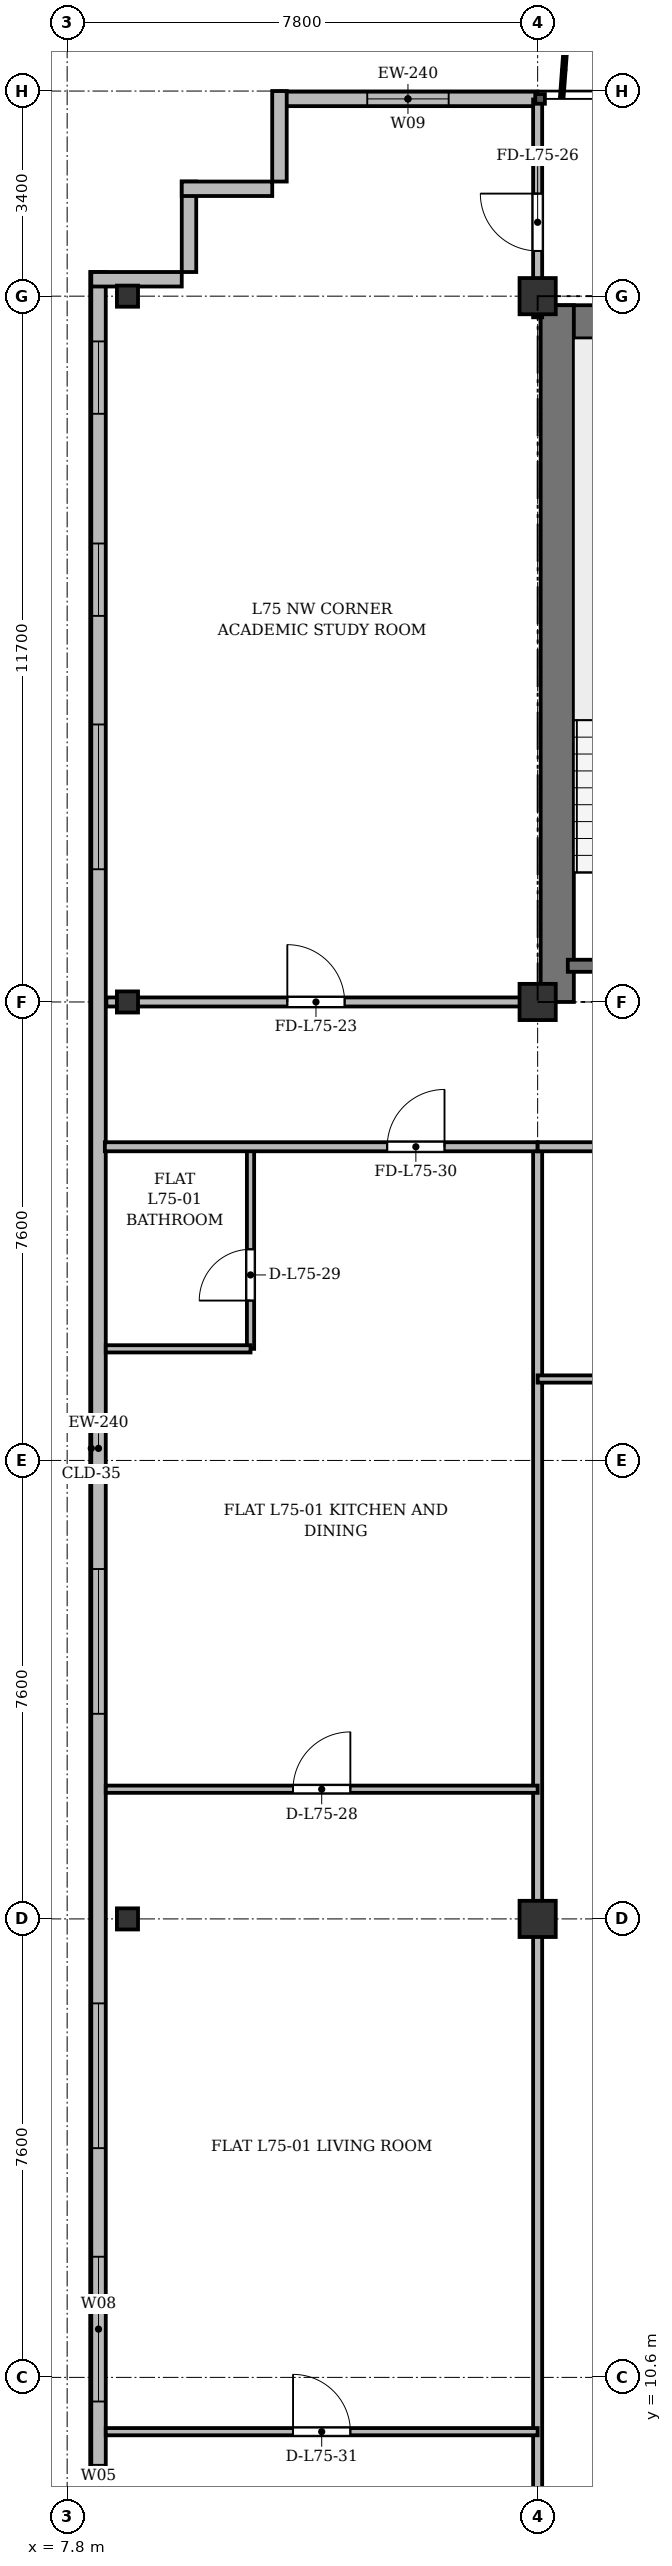
"""IFC4 building model, lengths in metres.
Left out: names, types, materials, properties, quantities, classifications, styles, units other than length and angle.
Written with IfcOpenShell. Run it as: python <this file> out.ifc"""

import sys

from ifc_helpers import new_model, si_unit, direction, frame, frame_2d, origin, origin_2d, place, context, subcontext, project, spatial, rectangle, i_section, extrude, source, transform, mapped, element, fill, save


model = new_model("IFC4")
c1 = context("Model", 3, precision=1e-05, world=origin(), true_north=direction((0.0, 1.0)))
c2 = subcontext(c1, "Body", "Model", "MODEL_VIEW")
j1 = project(units=[si_unit("LENGTHUNIT", "METRE"), si_unit("PLANEANGLEUNIT", "RADIAN")], contexts=[c1])
p1 = place(None, origin())
s1 = spatial("IfcSite", under=j1, at=p1, CompositionType="ELEMENT")
p2 = place(p1, origin())
s2 = spatial("IfcBuilding", under=s1, at=p2, CompositionType="ELEMENT")
p3 = place(p2, frame((0.0, 0.0, 288.3)))
s3 = spatial("IfcBuildingStorey", under=s2, at=p3, CompositionType="ELEMENT", Elevation=288.3)
m1 = source(origin(), c2, "Body", "SweptSolid", [
    extrude(i_section(OverallWidth=0.35, OverallDepth=0.35, WebThickness=0.018, FlangeThickness=0.028, at=origin_2d()), origin(), (0.0, 0.0, 1.0), 3.6),
])
for number, where, z_axis, x_axis in (
    (1, (8.8, 18.2, 0.0), (0.0, 0.0, 1.0), (1.0, 0.0, 0.0)),
    (2, (8.8, 33.4, 0.0), (0.0, 0.0, 1.0), (1.0, 0.0, 0.0)),
    (3, (8.8, 45.1, 0.0), (0.0, 0.0, 1.0), (1.0, 0.0, 0.0)),
):
    element("IfcColumn", number, at=place(p3, frame(where, z_axis=z_axis, x_axis=x_axis)), inside=s3, PredefinedType="COLUMN", context=c2, shape_type="MappedRepresentation", body=[
        mapped(m1, transform((0.0, 0.0, 0.0), x_axis=(1.0, 0.0, 0.0), y_axis=(0.0, 1.0, 0.0), z_axis=(0.0, 0.0, 1.0), scale=1.0)),
    ])
m2 = source(origin(), c2, "Body", "SweptSolid", [
    extrude(rectangle(XDim=0.6, YDim=0.6, at=origin_2d()), origin(), (0.0, 0.0, 1.0), 3.6),
])
for number, where, z_axis, x_axis in (
    (4, (15.6, 18.2, 0.0), (0.0, 0.0, 1.0), (1.0, 0.0, 0.0)),
    (5, (15.6, 33.4, 0.0), (0.0, 0.0, 1.0), (1.0, 0.0, 0.0)),
    (6, (15.6, 45.1, 0.0), (0.0, 0.0, 1.0), (1.0, 0.0, 0.0)),
):
    element("IfcColumn", number, at=place(p3, frame(where, z_axis=z_axis, x_axis=x_axis)), inside=s3, PredefinedType="COLUMN", context=c2, shape_type="MappedRepresentation", body=[
        mapped(m2, transform((0.0, 0.0, 0.0), x_axis=(1.0, 0.0, 0.0), y_axis=(0.0, 1.0, 0.0), z_axis=(0.0, 0.0, 1.0), scale=1.0)),
    ])
p4 = place(p3, frame((11.3, 48.37, 0.0), z_axis=(0.0, 0.0, 1.0), x_axis=(1.0, 0.0, 0.0)))
e7 = element("IfcWall", 7, at=p4, inside=s3, PredefinedType="SOLIDWALL", context=c2, shape_type="SweptSolid", body=[
    extrude(rectangle(XDim=4.3, YDim=0.24, at=frame_2d((2.15, 0.0))), origin(), (0.0, 0.0, 1.0), 3.37),
])
p5 = place(p4, frame((1.475, 0.0, 0.9)))
e8 = element("IfcOpeningElement", 8, at=p5, cuts=e7, PredefinedType="OPENING", context=c2, shape_type="SweptSolid", body=[
    extrude(rectangle(XDim=1.35, YDim=1.5, at=frame_2d((0.675, 0.75))), frame((0.0, 0.13, 0.0), z_axis=(0.0, -1.0, 0.0), x_axis=(1.0, 0.0, 0.0)), (0.0, 0.0, 1.0), 0.26),
])
p6 = place(p3, frame((8.32, 6.5, 0.0), z_axis=(0.0, 0.0, 1.0), x_axis=(0.0, 1.0, 0.0)))
e9 = element("IfcWall", 9, at=p6, inside=s3, PredefinedType="SOLIDWALL", context=c2, shape_type="SweptSolid", body=[
    extrude(rectangle(XDim=39.0, YDim=0.24, at=frame_2d((19.5, 0.0))), origin(), (0.0, 0.0, 1.0), 3.37),
])
p7 = place(p6, frame((1.45, 0.0, 0.92)))
e10 = element("IfcOpeningElement", 10, at=p7, cuts=e9, PredefinedType="OPENING", context=c2, shape_type="SweptSolid", body=[
    extrude(rectangle(XDim=1.2, YDim=1.65, at=frame_2d((0.6, 0.825))), frame((0.0, 0.13, 0.0), z_axis=(0.0, -1.0, 0.0), x_axis=(1.0, 0.0, 0.0)), (0.0, 0.0, 1.0), 0.26),
])
p8 = place(p6, frame((3.7, 0.0, 0.92)))
e11 = element("IfcOpeningElement", 11, at=p8, cuts=e9, PredefinedType="OPENING", context=c2, shape_type="SweptSolid", body=[
    extrude(rectangle(XDim=2.4, YDim=2.1, at=frame_2d((1.2, 1.05))), frame((0.0, 0.13, 0.0), z_axis=(0.0, -1.0, 0.0), x_axis=(1.0, 0.0, 0.0)), (0.0, 0.0, 1.0), 0.26),
])
p9 = place(p6, frame((7.9, 0.0, 0.92)))
e12 = element("IfcOpeningElement", 12, at=p9, cuts=e9, PredefinedType="OPENING", context=c2, shape_type="SweptSolid", body=[
    extrude(rectangle(XDim=2.4, YDim=2.1, at=frame_2d((1.2, 1.05))), frame((0.0, 0.13, 0.0), z_axis=(0.0, -1.0, 0.0), x_axis=(1.0, 0.0, 0.0)), (0.0, 0.0, 1.0), 0.26),
])
p10 = place(p6, frame((15.1, 0.0, 0.92)))
e13 = element("IfcOpeningElement", 13, at=p10, cuts=e9, PredefinedType="OPENING", context=c2, shape_type="SweptSolid", body=[
    extrude(rectangle(XDim=2.4, YDim=2.1, at=frame_2d((1.2, 1.05))), frame((0.0, 0.13, 0.0), z_axis=(0.0, -1.0, 0.0), x_axis=(1.0, 0.0, 0.0)), (0.0, 0.0, 1.0), 0.26),
])
p11 = place(p6, frame((29.1, 0.0, 0.92)))
e14 = element("IfcOpeningElement", 14, at=p11, cuts=e9, PredefinedType="OPENING", context=c2, shape_type="SweptSolid", body=[
    extrude(rectangle(XDim=2.4, YDim=2.1, at=frame_2d((1.2, 1.05))), frame((0.0, 0.13, 0.0), z_axis=(0.0, -1.0, 0.0), x_axis=(1.0, 0.0, 0.0)), (0.0, 0.0, 1.0), 0.26),
])
p12 = place(p6, frame((33.3, 0.0, 0.92)))
e15 = element("IfcOpeningElement", 15, at=p12, cuts=e9, PredefinedType="OPENING", context=c2, shape_type="SweptSolid", body=[
    extrude(rectangle(XDim=1.2, YDim=1.65, at=frame_2d((0.6, 0.825))), frame((0.0, 0.13, 0.0), z_axis=(0.0, -1.0, 0.0), x_axis=(1.0, 0.0, 0.0)), (0.0, 0.0, 1.0), 0.26),
])
p13 = place(p6, frame((36.65, 0.0, 0.92)))
e16 = element("IfcOpeningElement", 16, at=p13, cuts=e9, PredefinedType="OPENING", context=c2, shape_type="SweptSolid", body=[
    extrude(rectangle(XDim=1.2, YDim=1.65, at=frame_2d((0.6, 0.825))), frame((0.0, 0.13, 0.0), z_axis=(0.0, -1.0, 0.0), x_axis=(1.0, 0.0, 0.0)), (0.0, 0.0, 1.0), 0.26),
])
for number, where, z_axis, x_axis in (
    (17, (8.2, 45.38, 0.0), (0.0, 0.0, 1.0), (1.0, 0.0, 0.0)),
    (18, (9.82, 45.5, 0.0), (0.0, 0.0, 1.0), (0.0, 1.0, 0.0)),
    (19, (9.7, 46.88, 0.0), (0.0, 0.0, 1.0), (1.0, 0.0, 0.0)),
    (20, (11.32, 47.0, 0.0), (0.0, 0.0, 1.0), (0.0, 1.0, 0.0)),
):
    element("IfcWall", number, at=place(p3, frame(where, z_axis=z_axis, x_axis=x_axis)), inside=s3, PredefinedType="SOLIDWALL", context=c2, shape_type="SweptSolid", body=[
        extrude(rectangle(XDim=1.5, YDim=0.24, at=frame_2d((0.75, 0.0))), origin(), (0.0, 0.0, 1.0), 3.37),
    ])
p14 = place(p3, frame((15.65, 44.675, 0.0), z_axis=(0.0, 0.0, 1.0), x_axis=(1.0, 0.0, 0.0)))
e21 = element("IfcWall", 21, at=p14, inside=s3, PredefinedType="SHEAR", context=c2, shape_type="SweptSolid", body=[
    extrude(rectangle(XDim=43.1, YDim=0.55, at=frame_2d((21.55, 0.0))), origin(), (0.0, 0.0, 1.0), 3.37),
])
p15 = place(p3, frame((15.925, 33.4, 0.0), z_axis=(0.0, 0.0, 1.0), x_axis=(0.0, 1.0, 0.0)))
e22 = element("IfcWall", 22, at=p15, inside=s3, PredefinedType="SHEAR", context=c2, shape_type="SweptSolid", body=[
    extrude(rectangle(XDim=11.55, YDim=0.55, at=frame_2d((5.775, 0.0))), origin(), (0.0, 0.0, 1.0), 3.37),
])
p16 = place(p3, frame((16.1, 34.0, 0.0), z_axis=(0.0, 0.0, 1.0), x_axis=(1.0, 0.0, 0.0)))
e23 = element("IfcWall", 23, at=p16, inside=s3, PredefinedType="SHEAR", context=c2, shape_type="SweptSolid", body=[
    extrude(rectangle(XDim=3.4, YDim=0.2, at=frame_2d((1.7, 0.0))), origin(), (0.0, 0.0, 1.0), 3.37),
])
p17 = place(p3, frame((8.45, 33.4, 0.0), z_axis=(0.0, 0.0, 1.0), x_axis=(1.0, 0.0, 0.0)))
e24 = element("IfcWall", 24, at=p17, inside=s3, PredefinedType="PARTITIONING", context=c2, shape_type="SweptSolid", body=[
    extrude(rectangle(XDim=7.15, YDim=0.15, at=frame_2d((3.575, 0.0))), origin(), (0.0, 0.0, 1.0), 2.92),
])
p18 = place(p17, frame((3.0, 0.0, 0.0)))
e25 = element("IfcOpeningElement", 25, at=p18, cuts=e24, PredefinedType="OPENING", context=c2, shape_type="SweptSolid", body=[
    extrude(rectangle(XDim=0.95, YDim=2.15, at=frame_2d((0.475, 1.075))), frame((0.0, 0.085, 0.0), z_axis=(0.0, -1.0, 0.0), x_axis=(1.0, 0.0, 0.0)), (0.0, 0.0, 1.0), 0.17),
])
p19 = place(p3, frame((15.6, 44.75, 0.0), z_axis=(0.0, 0.0, 1.0), x_axis=(0.0, 1.0, 0.0)))
e26 = element("IfcWall", 26, at=p19, inside=s3, PredefinedType="PARTITIONING", context=c2, shape_type="SweptSolid", body=[
    extrude(rectangle(XDim=3.61, YDim=0.15, at=frame_2d((1.805, 0.0))), origin(), (0.0, 0.0, 1.0), 2.87),
])
p20 = place(p19, frame((1.1, 0.0, 0.0)))
e27 = element("IfcOpeningElement", 27, at=p20, cuts=e26, PredefinedType="OPENING", context=c2, shape_type="SweptSolid", body=[
    extrude(rectangle(XDim=0.95, YDim=2.15, at=frame_2d((0.475, 1.075))), frame((0.0, 0.085, 0.0), z_axis=(0.0, -1.0, 0.0), x_axis=(1.0, 0.0, 0.0)), (0.0, 0.0, 1.0), 0.17),
])
p21 = place(p3, frame((15.6, 3.725, 0.0), z_axis=(0.0, 0.0, 1.0), x_axis=(0.0, 1.0, 0.0)))
e28 = element("IfcWall", 28, at=p21, inside=s3, PredefinedType="PARTITIONING", context=c2, shape_type="SweptSolid", body=[
    extrude(rectangle(XDim=27.275, YDim=0.15, at=frame_2d((13.637, 0.0))), origin(), (0.0, 0.0, 1.0), 2.87),
])
p22 = place(p3, frame((8.44, 20.35, 0.0), z_axis=(0.0, 0.0, 1.0), x_axis=(1.0, 0.0, 0.0)))
e29 = element("IfcWall", 29, at=p22, inside=s3, PredefinedType="PARTITIONING", context=c2, shape_type="SweptSolid", body=[
    extrude(rectangle(XDim=7.16, YDim=0.12, at=frame_2d((3.58, 0.0))), origin(), (0.0, 0.0, 1.0), 2.87),
])
p23 = place(p22, frame((3.105, 0.0, 0.0)))
e30 = element("IfcOpeningElement", 30, at=p23, cuts=e29, PredefinedType="OPENING", context=c2, shape_type="SweptSolid", body=[
    extrude(rectangle(XDim=0.95, YDim=2.15, at=frame_2d((0.475, 1.075))), frame((0.0, 0.07, 0.0), z_axis=(0.0, -1.0, 0.0), x_axis=(1.0, 0.0, 0.0)), (0.0, 0.0, 1.0), 0.14),
])
p24 = place(p3, frame((10.84, 27.65, 0.0), z_axis=(0.0, 0.0, 1.0), x_axis=(0.0, 1.0, 0.0)))
e31 = element("IfcWall", 31, at=p24, inside=s3, PredefinedType="PARTITIONING", context=c2, shape_type="SweptSolid", body=[
    extrude(rectangle(XDim=3.35, YDim=0.12, at=frame_2d((1.675, 0.0))), origin(), (0.0, 0.0, 1.0), 3.37),
])
p25 = place(p24, frame((0.8, 0.0, 0.0)))
e32 = element("IfcOpeningElement", 32, at=p25, cuts=e31, PredefinedType="OPENING", context=c2, shape_type="SweptSolid", body=[
    extrude(rectangle(XDim=0.85, YDim=2.1, at=frame_2d((0.425, 1.05))), frame((0.0, 0.07, 0.0), z_axis=(0.0, -1.0, 0.0), x_axis=(1.0, 0.0, 0.0)), (0.0, 0.0, 1.0), 0.14),
])
p26 = place(p3, frame((8.44, 27.65, 0.0), z_axis=(0.0, 0.0, 1.0), x_axis=(1.0, 0.0, 0.0)))
e33 = element("IfcWall", 33, at=p26, inside=s3, PredefinedType="PARTITIONING", context=c2, shape_type="SweptSolid", body=[
    extrude(rectangle(XDim=2.4, YDim=0.12, at=frame_2d((1.2, 0.0))), origin(), (0.0, 0.0, 1.0), 2.87),
])
p27 = place(p3, frame((8.425, 31.0, 0.0), z_axis=(0.0, 0.0, 1.0), x_axis=(1.0, 0.0, 0.0)))
e34 = element("IfcWall", 34, at=p27, inside=s3, PredefinedType="PARTITIONING", context=c2, shape_type="SweptSolid", body=[
    extrude(rectangle(XDim=7.175, YDim=0.15, at=frame_2d((3.587, 0.0))), origin(), (0.0, 0.0, 1.0), 2.87),
])
p28 = place(p27, frame((4.681, 0.0, 0.0)))
e35 = element("IfcOpeningElement", 35, at=p28, cuts=e34, PredefinedType="OPENING", context=c2, shape_type="SweptSolid", body=[
    extrude(rectangle(XDim=0.95, YDim=2.15, at=frame_2d((0.475, 1.075))), frame((0.0, 0.085, 0.0), z_axis=(0.0, -1.0, 0.0), x_axis=(1.0, 0.0, 0.0)), (0.0, 0.0, 1.0), 0.17),
])
p29 = place(p3, frame((8.44, 9.7, 0.0), z_axis=(0.0, 0.0, 1.0), x_axis=(1.0, 0.0, 0.0)))
e36 = element("IfcWall", 36, at=p29, inside=s3, PredefinedType="PARTITIONING", context=c2, shape_type="SweptSolid", body=[
    extrude(rectangle(XDim=7.16, YDim=0.12, at=frame_2d((3.58, 0.0))), origin(), (0.0, 0.0, 1.0), 2.87),
])
p30 = place(p29, frame((3.105, 0.0, 0.0)))
e37 = element("IfcOpeningElement", 37, at=p30, cuts=e36, PredefinedType="OPENING", context=c2, shape_type="SweptSolid", body=[
    extrude(rectangle(XDim=0.95, YDim=2.15, at=frame_2d((0.475, 1.075))), frame((0.0, 0.07, 0.0), z_axis=(0.0, -1.0, 0.0), x_axis=(1.0, 0.0, 0.0)), (0.0, 0.0, 1.0), 0.14),
])
p31 = place(p3, frame((15.6, 31.0, 0.0), z_axis=(0.0, 0.0, 1.0), x_axis=(1.0, 0.0, 0.0)))
e38 = element("IfcWall", 38, at=p31, inside=s3, PredefinedType="PARTITIONING", context=c2, shape_type="SweptSolid", body=[
    extrude(rectangle(XDim=7.8, YDim=0.15, at=frame_2d((3.9, 0.0))), origin(), (0.0, 0.0, 1.0), 2.87),
])
p32 = place(p31, frame((3.333, 0.0, 0.0)))
e39 = element("IfcOpeningElement", 39, at=p32, cuts=e38, PredefinedType="OPENING", context=c2, shape_type="SweptSolid", body=[
    extrude(rectangle(XDim=0.95, YDim=2.15, at=frame_2d((0.475, 1.075))), frame((0.0, 0.085, 0.0), z_axis=(0.0, -1.0, 0.0), x_axis=(1.0, 0.0, 0.0)), (0.0, 0.0, 1.0), 0.17),
])
p33 = place(p3, frame((15.6, 27.15, 0.0), z_axis=(0.0, 0.0, 1.0), x_axis=(1.0, 0.0, 0.0)))
e40 = element("IfcWall", 40, at=p33, inside=s3, PredefinedType="PARTITIONING", context=c2, shape_type="SweptSolid", body=[
    extrude(rectangle(XDim=7.8, YDim=0.12, at=frame_2d((3.9, 0.0))), origin(), (0.0, 0.0, 1.0), 2.87),
])
p34 = place(p33, frame((3.333, 0.0, 0.0)))
e41 = element("IfcOpeningElement", 41, at=p34, cuts=e40, PredefinedType="OPENING", context=c2, shape_type="SweptSolid", body=[
    extrude(rectangle(XDim=0.95, YDim=2.15, at=frame_2d((0.475, 1.075))), frame((0.0, 0.07, 0.0), z_axis=(0.0, -1.0, 0.0), x_axis=(1.0, 0.0, 0.0)), (0.0, 0.0, 1.0), 0.14),
])
m3 = source(origin(), c2, "Body", "SweptSolid", [
    extrude(rectangle(XDim=1.35, YDim=1.5, at=frame_2d((0.675, 0.75))), frame((0.0, 0.03, 0.0), z_axis=(0.0, -1.0, 0.0), x_axis=(1.0, 0.0, 0.0)), (0.0, 0.0, 1.0), 0.06),
])
p35 = place(p5, origin())
e42 = element("IfcWindow", 42, at=p35, inside=s3, PartitioningType="SINGLE_PANEL", PredefinedType="WINDOW", context=c2, shape_type="MappedRepresentation", body=[
    mapped(m3, transform((0.0, 0.0, 0.0), x_axis=(1.0, 0.0, 0.0), y_axis=(0.0, 1.0, 0.0), z_axis=(0.0, 0.0, 1.0), scale=1.0)),
])
fill(e8, e42)
m4 = source(origin(), c2, "Body", "SweptSolid", [
    extrude(rectangle(XDim=1.2, YDim=1.65, at=frame_2d((0.6, 0.825))), frame((0.0, 0.03, 0.0), z_axis=(0.0, -1.0, 0.0), x_axis=(1.0, 0.0, 0.0)), (0.0, 0.0, 1.0), 0.06),
])
p36 = place(p7, origin())
e43 = element("IfcWindow", 43, at=p36, inside=s3, PartitioningType="SINGLE_PANEL", PredefinedType="WINDOW", context=c2, shape_type="MappedRepresentation", body=[
    mapped(m4, transform((0.0, 0.0, 0.0), x_axis=(1.0, 0.0, 0.0), y_axis=(0.0, 1.0, 0.0), z_axis=(0.0, 0.0, 1.0), scale=1.0)),
])
fill(e10, e43)
m5 = source(origin(), c2, "Body", "SweptSolid", [
    extrude(rectangle(XDim=2.4, YDim=2.1, at=frame_2d((1.2, 1.05))), frame((0.0, 0.03, 0.0), z_axis=(0.0, -1.0, 0.0), x_axis=(1.0, 0.0, 0.0)), (0.0, 0.0, 1.0), 0.06),
])
p37 = place(p8, origin())
e44 = element("IfcWindow", 44, at=p37, inside=s3, PartitioningType="SINGLE_PANEL", PredefinedType="WINDOW", context=c2, shape_type="MappedRepresentation", body=[
    mapped(m5, transform((0.0, 0.0, 0.0), x_axis=(1.0, 0.0, 0.0), y_axis=(0.0, 1.0, 0.0), z_axis=(0.0, 0.0, 1.0), scale=1.0)),
])
fill(e11, e44)
p38 = place(p9, origin())
e45 = element("IfcWindow", 45, at=p38, inside=s3, PartitioningType="SINGLE_PANEL", PredefinedType="WINDOW", context=c2, shape_type="MappedRepresentation", body=[
    mapped(m5, transform((0.0, 0.0, 0.0), x_axis=(1.0, 0.0, 0.0), y_axis=(0.0, 1.0, 0.0), z_axis=(0.0, 0.0, 1.0), scale=1.0)),
])
fill(e12, e45)
p39 = place(p10, origin())
e46 = element("IfcWindow", 46, at=p39, inside=s3, PartitioningType="SINGLE_PANEL", PredefinedType="WINDOW", context=c2, shape_type="MappedRepresentation", body=[
    mapped(m5, transform((0.0, 0.0, 0.0), x_axis=(1.0, 0.0, 0.0), y_axis=(0.0, 1.0, 0.0), z_axis=(0.0, 0.0, 1.0), scale=1.0)),
])
fill(e13, e46)
p40 = place(p11, origin())
e47 = element("IfcWindow", 47, at=p40, inside=s3, PartitioningType="SINGLE_PANEL", PredefinedType="WINDOW", context=c2, shape_type="MappedRepresentation", body=[
    mapped(m5, transform((0.0, 0.0, 0.0), x_axis=(1.0, 0.0, 0.0), y_axis=(0.0, 1.0, 0.0), z_axis=(0.0, 0.0, 1.0), scale=1.0)),
])
fill(e14, e47)
p41 = place(p12, origin())
e48 = element("IfcWindow", 48, at=p41, inside=s3, PartitioningType="SINGLE_PANEL", PredefinedType="WINDOW", context=c2, shape_type="MappedRepresentation", body=[
    mapped(m4, transform((0.0, 0.0, 0.0), x_axis=(1.0, 0.0, 0.0), y_axis=(0.0, 1.0, 0.0), z_axis=(0.0, 0.0, 1.0), scale=1.0)),
])
fill(e15, e48)
p42 = place(p13, origin())
e49 = element("IfcWindow", 49, at=p42, inside=s3, PartitioningType="SINGLE_PANEL", PredefinedType="WINDOW", context=c2, shape_type="MappedRepresentation", body=[
    mapped(m4, transform((0.0, 0.0, 0.0), x_axis=(1.0, 0.0, 0.0), y_axis=(0.0, 1.0, 0.0), z_axis=(0.0, 0.0, 1.0), scale=1.0)),
])
fill(e16, e49)
m6 = source(origin(), c2, "Body", "SweptSolid", [
    extrude(rectangle(XDim=0.95, YDim=2.15, at=frame_2d((0.475, 1.075))), frame((0.0, 0.025, 0.0), z_axis=(0.0, -1.0, 0.0), x_axis=(1.0, 0.0, 0.0)), (0.0, 0.0, 1.0), 0.05),
])
p43 = place(p18, origin())
e50 = element("IfcDoor", 50, at=p43, inside=s3, OperationType="SINGLE_SWING_LEFT", PredefinedType="DOOR", context=c2, shape_type="MappedRepresentation", body=[
    mapped(m6, transform((0.0, 0.0, 0.0), x_axis=(1.0, 0.0, 0.0), y_axis=(0.0, 1.0, 0.0), z_axis=(0.0, 0.0, 1.0), scale=1.0)),
])
fill(e25, e50)
p44 = place(p20, origin())
e51 = element("IfcDoor", 51, at=p44, inside=s3, OperationType="SINGLE_SWING_RIGHT", PredefinedType="DOOR", context=c2, shape_type="MappedRepresentation", body=[
    mapped(m6, transform((0.0, 0.0, 0.0), x_axis=(1.0, 0.0, 0.0), y_axis=(0.0, 1.0, 0.0), z_axis=(0.0, 0.0, 1.0), scale=1.0)),
])
fill(e27, e51)
p45 = place(p23, origin())
e52 = element("IfcDoor", 52, at=p45, inside=s3, OperationType="SINGLE_SWING_RIGHT", PredefinedType="DOOR", context=c2, shape_type="MappedRepresentation", body=[
    mapped(m6, transform((0.0, 0.0, 0.0), x_axis=(1.0, 0.0, 0.0), y_axis=(0.0, 1.0, 0.0), z_axis=(0.0, 0.0, 1.0), scale=1.0)),
])
fill(e30, e52)
m7 = source(origin(), c2, "Body", "SweptSolid", [
    extrude(rectangle(XDim=0.85, YDim=2.1, at=frame_2d((0.425, 1.05))), frame((0.0, 0.025, 0.0), z_axis=(0.0, -1.0, 0.0), x_axis=(1.0, 0.0, 0.0)), (0.0, 0.0, 1.0), 0.05),
])
p46 = place(p25, origin())
e53 = element("IfcDoor", 53, at=p46, inside=s3, OperationType="SINGLE_SWING_LEFT", PredefinedType="DOOR", context=c2, shape_type="MappedRepresentation", body=[
    mapped(m7, transform((0.0, 0.0, 0.0), x_axis=(1.0, 0.0, 0.0), y_axis=(0.0, 1.0, 0.0), z_axis=(0.0, 0.0, 1.0), scale=1.0)),
])
fill(e32, e53)
p47 = place(p28, origin())
e54 = element("IfcDoor", 54, at=p47, inside=s3, OperationType="SINGLE_SWING_RIGHT", PredefinedType="DOOR", context=c2, shape_type="MappedRepresentation", body=[
    mapped(m6, transform((0.0, 0.0, 0.0), x_axis=(1.0, 0.0, 0.0), y_axis=(0.0, 1.0, 0.0), z_axis=(0.0, 0.0, 1.0), scale=1.0)),
])
fill(e35, e54)
p48 = place(p30, origin())
e55 = element("IfcDoor", 55, at=p48, inside=s3, OperationType="SINGLE_SWING_LEFT", PredefinedType="DOOR", context=c2, shape_type="MappedRepresentation", body=[
    mapped(m6, transform((0.0, 0.0, 0.0), x_axis=(1.0, 0.0, 0.0), y_axis=(0.0, 1.0, 0.0), z_axis=(0.0, 0.0, 1.0), scale=1.0)),
])
fill(e37, e55)
save(model, sys.argv[1])
